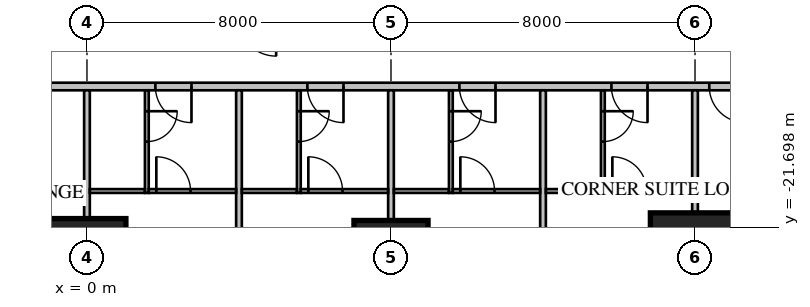
"""IFC4 building model, lengths in metres.
Left out: names, types, materials, properties, quantities, classifications, styles, units other than length and angle.
Written with IfcOpenShell. Run it as: python <this file> out.ifc"""

import sys

from ifc_helpers import new_model, si_unit, direction, frame, frame_2d, origin, origin_2d, place, context, subcontext, project, spatial, rectangle, extrude, element, fill, save


model = new_model("IFC4")
c1 = context("Model", 3, precision=1e-05, world=origin(), true_north=direction((0.0, 1.0)))
c2 = subcontext(c1, "Body", "Model", "MODEL_VIEW")
j1 = project(units=[si_unit("LENGTHUNIT", "METRE"), si_unit("PLANEANGLEUNIT", "RADIAN")], contexts=[c1])
p1 = place(None, origin())
s1 = spatial("IfcSite", under=j1, at=p1, CompositionType="ELEMENT")
p2 = place(p1, origin())
s2 = spatial("IfcBuilding", under=s1, at=p2, CompositionType="ELEMENT")
p3 = place(p2, frame((0.0, 0.0, 19.85)))
s3 = spatial("IfcBuildingStorey", under=s2, at=p3, CompositionType="ELEMENT", Elevation=19.85)
p4 = place(p3, frame((0.0, -22.5, 0.0), z_axis=(0.0, 0.0, 1.0), x_axis=(1.0, 0.0, 0.0)))
e1 = element("IfcColumn", 1, at=p4, inside=s3, PredefinedType="COLUMN", context=c2, shape_type="SweptSolid", body=[
    extrude(rectangle(XDim=2.05, YDim=2.05, at=origin_2d()), origin(), (0.0, 0.0, 1.0), 3.85),
])
p5 = place(p3, frame((8.0, -22.5, 0.0), z_axis=(0.0, 0.0, 1.0), x_axis=(1.0, 0.0, 0.0)))
e2 = element("IfcColumn", 2, at=p5, inside=s3, PredefinedType="COLUMN", context=c2, shape_type="SweptSolid", body=[
    extrude(rectangle(XDim=1.95, YDim=1.95, at=origin_2d()), origin(), (0.0, 0.0, 1.0), 3.85),
])
p6 = place(p3, frame((16.0, -22.5, 0.0), z_axis=(0.0, 0.0, 1.0), x_axis=(1.0, 0.0, 0.0)))
e3 = element("IfcColumn", 3, at=p6, inside=s3, PredefinedType="COLUMN", context=c2, shape_type="SweptSolid", body=[
    extrude(rectangle(XDim=2.35, YDim=2.35, at=origin_2d()), origin(), (0.0, 0.0, 1.0), 3.85),
])
p7 = place(p3, frame((-18.0, -18.0, 0.0), z_axis=(0.0, 0.0, 1.0), x_axis=(1.0, 0.0, 0.0)))
e4 = element("IfcWall", 4, at=p7, inside=s3, PredefinedType="PARTITIONING", context=c2, shape_type="SweptSolid", body=[
    extrude(rectangle(XDim=36.0, YDim=0.2, at=frame_2d((18.0, 0.0))), origin(), (0.0, 0.0, 1.0), 3.65),
])
p8 = place(p7, frame((0.375, 0.0, 0.0)))
e5 = element("IfcOpeningElement", 5, at=p8, cuts=e4, PredefinedType="OPENING", context=c2, shape_type="SweptSolid", body=[
    extrude(rectangle(XDim=1.0, YDim=2.1, at=frame_2d((0.5, 1.05))), frame((0.0, 0.12, 0.0), z_axis=(0.0, -1.0, 0.0), x_axis=(1.0, 0.0, 0.0)), (0.0, 0.0, 1.0), 0.24),
])
p9 = place(p7, frame((2.45, 0.0, 0.0)))
e6 = element("IfcOpeningElement", 6, at=p9, cuts=e4, PredefinedType="OPENING", context=c2, shape_type="SweptSolid", body=[
    extrude(rectangle(XDim=0.8, YDim=2.1, at=frame_2d((0.4, 1.05))), frame((0.0, 0.12, 0.0), z_axis=(0.0, -1.0, 0.0), x_axis=(1.0, 0.0, 0.0)), (0.0, 0.0, 1.0), 0.24),
])
p10 = place(p7, frame((4.05, 0.0, 0.0)))
e7 = element("IfcOpeningElement", 7, at=p10, cuts=e4, PredefinedType="OPENING", context=c2, shape_type="SweptSolid", body=[
    extrude(rectangle(XDim=1.0, YDim=2.1, at=frame_2d((0.5, 1.05))), frame((0.0, 0.12, 0.0), z_axis=(0.0, -1.0, 0.0), x_axis=(1.0, 0.0, 0.0)), (0.0, 0.0, 1.0), 0.24),
])
p11 = place(p7, frame((6.45, 0.0, 0.0)))
e8 = element("IfcOpeningElement", 8, at=p11, cuts=e4, PredefinedType="OPENING", context=c2, shape_type="SweptSolid", body=[
    extrude(rectangle(XDim=0.9, YDim=2.1, at=frame_2d((0.45, 1.05))), frame((0.0, 0.12, 0.0), z_axis=(0.0, -1.0, 0.0), x_axis=(1.0, 0.0, 0.0)), (0.0, 0.0, 1.0), 0.24),
])
p12 = place(p7, frame((8.15, 0.0, 0.0)))
e9 = element("IfcOpeningElement", 9, at=p12, cuts=e4, PredefinedType="OPENING", context=c2, shape_type="SweptSolid", body=[
    extrude(rectangle(XDim=1.0, YDim=2.1, at=frame_2d((0.5, 1.05))), frame((0.0, 0.12, 0.0), z_axis=(0.0, -1.0, 0.0), x_axis=(1.0, 0.0, 0.0)), (0.0, 0.0, 1.0), 0.24),
])
p13 = place(p7, frame((19.8, 0.0, 0.0)))
e10 = element("IfcOpeningElement", 10, at=p13, cuts=e4, PredefinedType="OPENING", context=c2, shape_type="SweptSolid", body=[
    extrude(rectangle(XDim=0.95, YDim=2.1, at=frame_2d((0.475, 1.05))), frame((0.0, 0.12, 0.0), z_axis=(0.0, -1.0, 0.0), x_axis=(1.0, 0.0, 0.0)), (0.0, 0.0, 1.0), 0.24),
])
p14 = place(p7, frame((23.8, 0.0, 0.0)))
e11 = element("IfcOpeningElement", 11, at=p14, cuts=e4, PredefinedType="OPENING", context=c2, shape_type="SweptSolid", body=[
    extrude(rectangle(XDim=0.95, YDim=2.1, at=frame_2d((0.475, 1.05))), frame((0.0, 0.12, 0.0), z_axis=(0.0, -1.0, 0.0), x_axis=(1.0, 0.0, 0.0)), (0.0, 0.0, 1.0), 0.24),
])
p15 = place(p7, frame((27.8, 0.0, 0.0)))
e12 = element("IfcOpeningElement", 12, at=p15, cuts=e4, PredefinedType="OPENING", context=c2, shape_type="SweptSolid", body=[
    extrude(rectangle(XDim=0.95, YDim=2.1, at=frame_2d((0.475, 1.05))), frame((0.0, 0.12, 0.0), z_axis=(0.0, -1.0, 0.0), x_axis=(1.0, 0.0, 0.0)), (0.0, 0.0, 1.0), 0.24),
])
p16 = place(p7, frame((31.8, 0.0, 0.0)))
e13 = element("IfcOpeningElement", 13, at=p16, cuts=e4, PredefinedType="OPENING", context=c2, shape_type="SweptSolid", body=[
    extrude(rectangle(XDim=0.95, YDim=2.1, at=frame_2d((0.475, 1.05))), frame((0.0, 0.12, 0.0), z_axis=(0.0, -1.0, 0.0), x_axis=(1.0, 0.0, 0.0)), (0.0, 0.0, 1.0), 0.24),
])
p17 = place(p7, frame((34.375, 0.0, 0.0)))
e14 = element("IfcOpeningElement", 14, at=p17, cuts=e4, PredefinedType="OPENING", context=c2, shape_type="SweptSolid", body=[
    extrude(rectangle(XDim=0.95, YDim=2.1, at=frame_2d((0.475, 1.05))), frame((0.0, 0.12, 0.0), z_axis=(0.0, -1.0, 0.0), x_axis=(1.0, 0.0, 0.0)), (0.0, 0.0, 1.0), 0.24),
])
p18 = place(p7, frame((11.2, 0.0, 0.0)))
e15 = element("IfcOpeningElement", 15, at=p18, cuts=e4, PredefinedType="OPENING", context=c2, shape_type="SweptSolid", body=[
    extrude(rectangle(XDim=1.0, YDim=2.1, at=frame_2d((0.5, 1.05))), frame((0.0, 0.12, 0.0), z_axis=(0.0, -1.0, 0.0), x_axis=(1.0, 0.0, 0.0)), (0.0, 0.0, 1.0), 0.24),
])
p19 = place(p3, frame((0.0, -18.1, 0.0), z_axis=(0.0, 0.0, 1.0), x_axis=(0.0, -1.0, 0.0)))
e16 = element("IfcWall", 16, at=p19, inside=s3, PredefinedType="PARTITIONING", context=c2, shape_type="SweptSolid", body=[
    extrude(rectangle(XDim=6.6, YDim=0.15, at=frame_2d((3.3, 0.0))), origin(), (0.0, 0.0, 1.0), 2.809),
])
for number, where, z_axis, x_axis in (
    (17, (4.0, -18.1, 0.0), (0.0, 0.0, 1.0), (0.0, -1.0, 0.0)),
    (18, (8.0, -18.1, 0.0), (0.0, 0.0, 1.0), (0.0, -1.0, 0.0)),
    (19, (12.0, -18.1, 0.0), (0.0, 0.0, 1.0), (0.0, -1.0, 0.0)),
):
    element("IfcWall", number, at=place(p3, frame(where, z_axis=z_axis, x_axis=x_axis)), inside=s3, PredefinedType="PARTITIONING", context=c2, shape_type="SweptSolid", body=[
        extrude(rectangle(XDim=6.6, YDim=0.15, at=frame_2d((3.3, 0.0))), origin(), (0.0, 0.0, 1.0), 3.65),
    ])
p20 = place(p3, frame((16.0, -18.1, 0.0), z_axis=(0.0, 0.0, 1.0), x_axis=(0.0, -1.0, 0.0)))
e20 = element("IfcWall", 20, at=p20, inside=s3, PredefinedType="PARTITIONING", context=c2, shape_type="SweptSolid", body=[
    extrude(rectangle(XDim=6.589, YDim=0.15, at=frame_2d((3.295, 0.0))), origin(), (0.0, 0.0, 1.0), 3.65),
])
p21 = place(p3, frame((1.575, -18.1, 0.0), z_axis=(0.0, 0.0, 1.0), x_axis=(0.0, -1.0, 0.0)))
e21 = element("IfcWall", 21, at=p21, inside=s3, PredefinedType="PARTITIONING", context=c2, shape_type="SweptSolid", body=[
    extrude(rectangle(XDim=2.7, YDim=0.1, at=frame_2d((1.35, 0.0))), origin(), (0.0, 0.0, 1.0), 3.65),
])
p22 = place(p21, frame((0.55, 0.0, 0.0)))
e22 = element("IfcOpeningElement", 22, at=p22, cuts=e21, PredefinedType="OPENING", context=c2, shape_type="SweptSolid", body=[
    extrude(rectangle(XDim=0.8, YDim=2.1, at=frame_2d((0.4, 1.05))), frame((0.0, 0.07, 0.0), z_axis=(0.0, -1.0, 0.0), x_axis=(1.0, 0.0, 0.0)), (0.0, 0.0, 1.0), 0.14),
])
p23 = place(p3, frame((0.075, -20.75, 0.0), z_axis=(0.0, 0.0, 1.0), x_axis=(1.0, 0.0, 0.0)))
e23 = element("IfcWall", 23, at=p23, inside=s3, PredefinedType="PARTITIONING", context=c2, shape_type="SweptSolid", body=[
    extrude(rectangle(XDim=1.45, YDim=0.1, at=frame_2d((0.725, 0.0))), origin(), (0.0, 0.0, 1.0), 3.65),
])
p24 = place(p3, frame((5.575, -18.1, 0.0), z_axis=(0.0, 0.0, 1.0), x_axis=(0.0, -1.0, 0.0)))
e24 = element("IfcWall", 24, at=p24, inside=s3, PredefinedType="PARTITIONING", context=c2, shape_type="SweptSolid", body=[
    extrude(rectangle(XDim=2.7, YDim=0.1, at=frame_2d((1.35, 0.0))), origin(), (0.0, 0.0, 1.0), 3.65),
])
p25 = place(p24, frame((0.55, 0.0, 0.0)))
e25 = element("IfcOpeningElement", 25, at=p25, cuts=e24, PredefinedType="OPENING", context=c2, shape_type="SweptSolid", body=[
    extrude(rectangle(XDim=0.8, YDim=2.1, at=frame_2d((0.4, 1.05))), frame((0.0, 0.07, 0.0), z_axis=(0.0, -1.0, 0.0), x_axis=(1.0, 0.0, 0.0)), (0.0, 0.0, 1.0), 0.14),
])
p26 = place(p3, frame((4.075, -20.75, 0.0), z_axis=(0.0, 0.0, 1.0), x_axis=(1.0, 0.0, 0.0)))
e26 = element("IfcWall", 26, at=p26, inside=s3, PredefinedType="PARTITIONING", context=c2, shape_type="SweptSolid", body=[
    extrude(rectangle(XDim=1.45, YDim=0.1, at=frame_2d((0.725, 0.0))), origin(), (0.0, 0.0, 1.0), 3.65),
])
p27 = place(p3, frame((9.575, -18.1, 0.0), z_axis=(0.0, 0.0, 1.0), x_axis=(0.0, -1.0, 0.0)))
e27 = element("IfcWall", 27, at=p27, inside=s3, PredefinedType="PARTITIONING", context=c2, shape_type="SweptSolid", body=[
    extrude(rectangle(XDim=2.7, YDim=0.1, at=frame_2d((1.35, 0.0))), origin(), (0.0, 0.0, 1.0), 3.65),
])
p28 = place(p27, frame((0.55, 0.0, 0.0)))
e28 = element("IfcOpeningElement", 28, at=p28, cuts=e27, PredefinedType="OPENING", context=c2, shape_type="SweptSolid", body=[
    extrude(rectangle(XDim=0.8, YDim=2.1, at=frame_2d((0.4, 1.05))), frame((0.0, 0.07, 0.0), z_axis=(0.0, -1.0, 0.0), x_axis=(1.0, 0.0, 0.0)), (0.0, 0.0, 1.0), 0.14),
])
p29 = place(p3, frame((8.075, -20.75, 0.0), z_axis=(0.0, 0.0, 1.0), x_axis=(1.0, 0.0, 0.0)))
e29 = element("IfcWall", 29, at=p29, inside=s3, PredefinedType="PARTITIONING", context=c2, shape_type="SweptSolid", body=[
    extrude(rectangle(XDim=1.45, YDim=0.1, at=frame_2d((0.725, 0.0))), origin(), (0.0, 0.0, 1.0), 3.65),
])
p30 = place(p3, frame((13.575, -18.1, 0.0), z_axis=(0.0, 0.0, 1.0), x_axis=(0.0, -1.0, 0.0)))
e30 = element("IfcWall", 30, at=p30, inside=s3, PredefinedType="PARTITIONING", context=c2, shape_type="SweptSolid", body=[
    extrude(rectangle(XDim=2.7, YDim=0.1, at=frame_2d((1.35, 0.0))), origin(), (0.0, 0.0, 1.0), 3.65),
])
p31 = place(p30, frame((0.55, 0.0, 0.0)))
e31 = element("IfcOpeningElement", 31, at=p31, cuts=e30, PredefinedType="OPENING", context=c2, shape_type="SweptSolid", body=[
    extrude(rectangle(XDim=0.8, YDim=2.1, at=frame_2d((0.4, 1.05))), frame((0.0, 0.07, 0.0), z_axis=(0.0, -1.0, 0.0), x_axis=(1.0, 0.0, 0.0)), (0.0, 0.0, 1.0), 0.14),
])
p32 = place(p3, frame((12.075, -20.75, 0.0), z_axis=(0.0, 0.0, 1.0), x_axis=(1.0, 0.0, 0.0)))
e32 = element("IfcWall", 32, at=p32, inside=s3, PredefinedType="PARTITIONING", context=c2, shape_type="SweptSolid", body=[
    extrude(rectangle(XDim=1.45, YDim=0.1, at=frame_2d((0.725, 0.0))), origin(), (0.0, 0.0, 1.0), 3.65),
])
p33 = place(p3, frame((1.625, -20.75, 0.0), z_axis=(0.0, 0.0, 1.0), x_axis=(1.0, 0.0, 0.0)))
e33 = element("IfcWall", 33, at=p33, inside=s3, PredefinedType="PARTITIONING", context=c2, shape_type="SweptSolid", body=[
    extrude(rectangle(XDim=2.3, YDim=0.1, at=frame_2d((1.15, 0.0))), origin(), (0.0, 0.0, 1.0), 3.65),
])
p34 = place(p33, frame((0.2, 0.0, 0.0)))
e34 = element("IfcOpeningElement", 34, at=p34, cuts=e33, PredefinedType="OPENING", context=c2, shape_type="SweptSolid", body=[
    extrude(rectangle(XDim=0.9, YDim=2.1, at=frame_2d((0.45, 1.05))), frame((0.0, 0.07, 0.0), z_axis=(0.0, -1.0, 0.0), x_axis=(1.0, 0.0, 0.0)), (0.0, 0.0, 1.0), 0.14),
])
p35 = place(p3, frame((5.625, -20.75, 0.0), z_axis=(0.0, 0.0, 1.0), x_axis=(1.0, 0.0, 0.0)))
e35 = element("IfcWall", 35, at=p35, inside=s3, PredefinedType="PARTITIONING", context=c2, shape_type="SweptSolid", body=[
    extrude(rectangle(XDim=2.3, YDim=0.1, at=frame_2d((1.15, 0.0))), origin(), (0.0, 0.0, 1.0), 3.65),
])
p36 = place(p35, frame((0.2, 0.0, 0.0)))
e36 = element("IfcOpeningElement", 36, at=p36, cuts=e35, PredefinedType="OPENING", context=c2, shape_type="SweptSolid", body=[
    extrude(rectangle(XDim=0.9, YDim=2.1, at=frame_2d((0.45, 1.05))), frame((0.0, 0.07, 0.0), z_axis=(0.0, -1.0, 0.0), x_axis=(1.0, 0.0, 0.0)), (0.0, 0.0, 1.0), 0.14),
])
p37 = place(p3, frame((9.625, -20.75, 0.0), z_axis=(0.0, 0.0, 1.0), x_axis=(1.0, 0.0, 0.0)))
e37 = element("IfcWall", 37, at=p37, inside=s3, PredefinedType="PARTITIONING", context=c2, shape_type="SweptSolid", body=[
    extrude(rectangle(XDim=2.3, YDim=0.1, at=frame_2d((1.15, 0.0))), origin(), (0.0, 0.0, 1.0), 3.65),
])
p38 = place(p37, frame((0.2, 0.0, 0.0)))
e38 = element("IfcOpeningElement", 38, at=p38, cuts=e37, PredefinedType="OPENING", context=c2, shape_type="SweptSolid", body=[
    extrude(rectangle(XDim=0.9, YDim=2.1, at=frame_2d((0.45, 1.05))), frame((0.0, 0.07, 0.0), z_axis=(0.0, -1.0, 0.0), x_axis=(1.0, 0.0, 0.0)), (0.0, 0.0, 1.0), 0.14),
])
p39 = place(p3, frame((13.625, -20.75, 0.0), z_axis=(0.0, 0.0, 1.0), x_axis=(1.0, 0.0, 0.0)))
e39 = element("IfcWall", 39, at=p39, inside=s3, PredefinedType="PARTITIONING", context=c2, shape_type="SweptSolid", body=[
    extrude(rectangle(XDim=2.3, YDim=0.1, at=frame_2d((1.15, 0.0))), origin(), (0.0, 0.0, 1.0), 3.65),
])
p40 = place(p39, frame((0.2, 0.0, 0.0)))
e40 = element("IfcOpeningElement", 40, at=p40, cuts=e39, PredefinedType="OPENING", context=c2, shape_type="SweptSolid", body=[
    extrude(rectangle(XDim=0.9, YDim=2.1, at=frame_2d((0.45, 1.05))), frame((0.0, 0.07, 0.0), z_axis=(0.0, -1.0, 0.0), x_axis=(1.0, 0.0, 0.0)), (0.0, 0.0, 1.0), 0.14),
])
p41 = place(p13, origin())
e41 = element("IfcDoor", 41, at=p41, inside=s3, OperationType="SINGLE_SWING_RIGHT", PredefinedType="DOOR", context=c2, shape_type="SweptSolid", body=[
    extrude(rectangle(XDim=0.95, YDim=2.1, at=frame_2d((0.475, 1.05))), frame((0.0, 0.025, 0.0), z_axis=(0.0, -1.0, 0.0), x_axis=(1.0, 0.0, 0.0)), (0.0, 0.0, 1.0), 0.05),
])
fill(e10, e41)
p42 = place(p22, origin())
e42 = element("IfcDoor", 42, at=p42, inside=s3, OperationType="SINGLE_SWING_LEFT", PredefinedType="DOOR", context=c2, shape_type="SweptSolid", body=[
    extrude(rectangle(XDim=0.8, YDim=2.1, at=frame_2d((0.4, 1.05))), frame((0.0, 0.025, 0.0), z_axis=(0.0, -1.0, 0.0), x_axis=(1.0, 0.0, 0.0)), (0.0, 0.0, 1.0), 0.05),
])
fill(e22, e42)
p43 = place(p14, origin())
e43 = element("IfcDoor", 43, at=p43, inside=s3, OperationType="SINGLE_SWING_RIGHT", PredefinedType="DOOR", context=c2, shape_type="SweptSolid", body=[
    extrude(rectangle(XDim=0.95, YDim=2.1, at=frame_2d((0.475, 1.05))), frame((0.0, 0.025, 0.0), z_axis=(0.0, -1.0, 0.0), x_axis=(1.0, 0.0, 0.0)), (0.0, 0.0, 1.0), 0.05),
])
fill(e11, e43)
p44 = place(p25, origin())
e44 = element("IfcDoor", 44, at=p44, inside=s3, OperationType="SINGLE_SWING_LEFT", PredefinedType="DOOR", context=c2, shape_type="SweptSolid", body=[
    extrude(rectangle(XDim=0.8, YDim=2.1, at=frame_2d((0.4, 1.05))), frame((0.0, 0.025, 0.0), z_axis=(0.0, -1.0, 0.0), x_axis=(1.0, 0.0, 0.0)), (0.0, 0.0, 1.0), 0.05),
])
fill(e25, e44)
p45 = place(p15, origin())
e45 = element("IfcDoor", 45, at=p45, inside=s3, OperationType="SINGLE_SWING_RIGHT", PredefinedType="DOOR", context=c2, shape_type="SweptSolid", body=[
    extrude(rectangle(XDim=0.95, YDim=2.1, at=frame_2d((0.475, 1.05))), frame((0.0, 0.025, 0.0), z_axis=(0.0, -1.0, 0.0), x_axis=(1.0, 0.0, 0.0)), (0.0, 0.0, 1.0), 0.05),
])
fill(e12, e45)
p46 = place(p28, origin())
e46 = element("IfcDoor", 46, at=p46, inside=s3, OperationType="SINGLE_SWING_LEFT", PredefinedType="DOOR", context=c2, shape_type="SweptSolid", body=[
    extrude(rectangle(XDim=0.8, YDim=2.1, at=frame_2d((0.4, 1.05))), frame((0.0, 0.025, 0.0), z_axis=(0.0, -1.0, 0.0), x_axis=(1.0, 0.0, 0.0)), (0.0, 0.0, 1.0), 0.05),
])
fill(e28, e46)
p47 = place(p16, origin())
e47 = element("IfcDoor", 47, at=p47, inside=s3, OperationType="SINGLE_SWING_RIGHT", PredefinedType="DOOR", context=c2, shape_type="SweptSolid", body=[
    extrude(rectangle(XDim=0.95, YDim=2.1, at=frame_2d((0.475, 1.05))), frame((0.0, 0.025, 0.0), z_axis=(0.0, -1.0, 0.0), x_axis=(1.0, 0.0, 0.0)), (0.0, 0.0, 1.0), 0.05),
])
fill(e13, e47)
p48 = place(p31, origin())
e48 = element("IfcDoor", 48, at=p48, inside=s3, OperationType="SINGLE_SWING_LEFT", PredefinedType="DOOR", context=c2, shape_type="SweptSolid", body=[
    extrude(rectangle(XDim=0.8, YDim=2.1, at=frame_2d((0.4, 1.05))), frame((0.0, 0.025, 0.0), z_axis=(0.0, -1.0, 0.0), x_axis=(1.0, 0.0, 0.0)), (0.0, 0.0, 1.0), 0.05),
])
fill(e31, e48)
p49 = place(p17, origin())
e49 = element("IfcDoor", 49, at=p49, inside=s3, OperationType="SINGLE_SWING_RIGHT", PredefinedType="DOOR", context=c2, shape_type="SweptSolid", body=[
    extrude(rectangle(XDim=0.95, YDim=2.1, at=frame_2d((0.475, 1.05))), frame((0.0, 0.025, 0.0), z_axis=(0.0, -1.0, 0.0), x_axis=(1.0, 0.0, 0.0)), (0.0, 0.0, 1.0), 0.05),
])
fill(e14, e49)
p50 = place(p34, origin())
e50 = element("IfcDoor", 50, at=p50, inside=s3, OperationType="SINGLE_SWING_LEFT", PredefinedType="DOOR", context=c2, shape_type="SweptSolid", body=[
    extrude(rectangle(XDim=0.9, YDim=2.1, at=frame_2d((0.45, 1.05))), frame((0.0, 0.025, 0.0), z_axis=(0.0, -1.0, 0.0), x_axis=(1.0, 0.0, 0.0)), (0.0, 0.0, 1.0), 0.05),
])
fill(e34, e50)
p51 = place(p36, origin())
e51 = element("IfcDoor", 51, at=p51, inside=s3, OperationType="SINGLE_SWING_LEFT", PredefinedType="DOOR", context=c2, shape_type="SweptSolid", body=[
    extrude(rectangle(XDim=0.9, YDim=2.1, at=frame_2d((0.45, 1.05))), frame((0.0, 0.025, 0.0), z_axis=(0.0, -1.0, 0.0), x_axis=(1.0, 0.0, 0.0)), (0.0, 0.0, 1.0), 0.05),
])
fill(e36, e51)
p52 = place(p38, origin())
e52 = element("IfcDoor", 52, at=p52, inside=s3, OperationType="SINGLE_SWING_LEFT", PredefinedType="DOOR", context=c2, shape_type="SweptSolid", body=[
    extrude(rectangle(XDim=0.9, YDim=2.1, at=frame_2d((0.45, 1.05))), frame((0.0, 0.025, 0.0), z_axis=(0.0, -1.0, 0.0), x_axis=(1.0, 0.0, 0.0)), (0.0, 0.0, 1.0), 0.05),
])
fill(e38, e52)
p53 = place(p40, origin())
e53 = element("IfcDoor", 53, at=p53, inside=s3, OperationType="SINGLE_SWING_LEFT", PredefinedType="DOOR", context=c2, shape_type="SweptSolid", body=[
    extrude(rectangle(XDim=0.9, YDim=2.1, at=frame_2d((0.45, 1.05))), frame((0.0, 0.025, 0.0), z_axis=(0.0, -1.0, 0.0), x_axis=(1.0, 0.0, 0.0)), (0.0, 0.0, 1.0), 0.05),
])
fill(e40, e53)
save(model, sys.argv[1])
